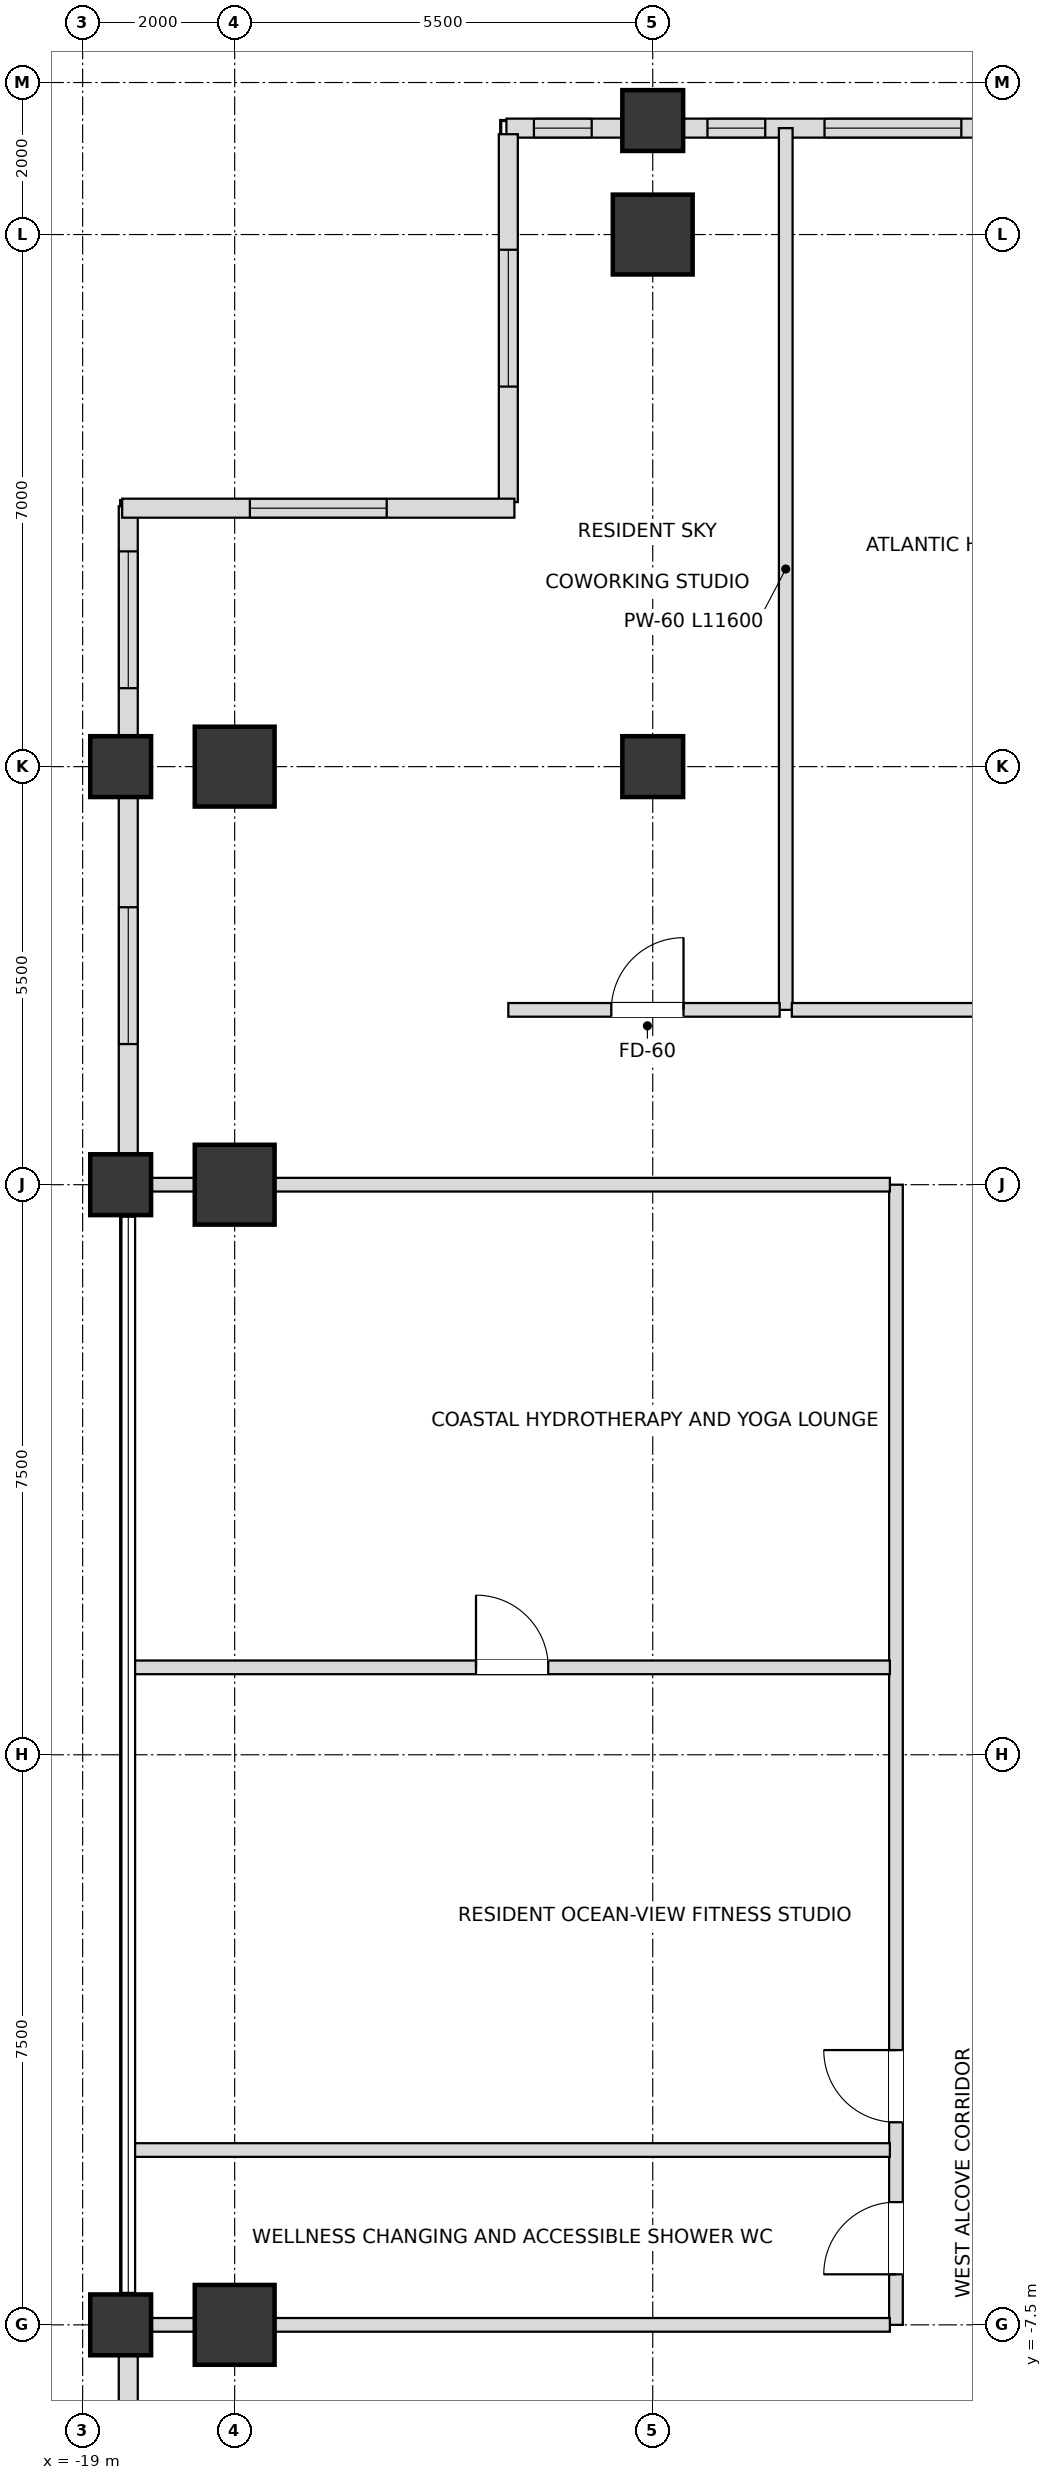
"""IFC4 building model, lengths in metres.
Left out: names, types, materials, properties, quantities, classifications, styles, units other than length and angle.
Written with IfcOpenShell. Run it as: python <this file> out.ifc"""

import sys

from ifc_helpers import new_model, si_unit, direction, frame, frame_2d, origin, origin_2d, place, context, subcontext, project, spatial, rectangle, extrude, element, fill, save


model = new_model("IFC4")
c1 = context("Model", 3, precision=1e-05, world=origin(), true_north=direction((0.0, 1.0)))
c2 = subcontext(c1, "Body", "Model", "MODEL_VIEW")
j1 = project(units=[si_unit("LENGTHUNIT", "METRE"), si_unit("PLANEANGLEUNIT", "RADIAN")], contexts=[c1])
p1 = place(None, origin())
s1 = spatial("IfcSite", under=j1, at=p1, CompositionType="ELEMENT")
p2 = place(p1, origin())
s2 = spatial("IfcBuilding", under=s1, at=p2, CompositionType="ELEMENT")
p3 = place(p2, frame((0.0, 0.0, 205.2)))
s3 = spatial("IfcBuildingStorey", under=s2, at=p3, CompositionType="ELEMENT", Elevation=205.2)
for number, where, z_axis, x_axis in (
    (1, (-11.5, 20.0, 0.0), (0.0, 0.0, 1.0), (1.0, 0.0, 0.0)),
    (2, (-17.0, 13.0, 0.0), (0.0, 0.0, 1.0), (1.0, 0.0, 0.0)),
    (3, (-17.0, 7.5, 0.0), (0.0, 0.0, 1.0), (1.0, 0.0, 0.0)),
    (4, (-17.0, -7.5, 0.0), (0.0, 0.0, 1.0), (1.0, 0.0, 0.0)),
):
    element("IfcColumn", number, at=place(p3, frame(where, z_axis=z_axis, x_axis=x_axis)), inside=s3, PredefinedType="USERDEFINED", context=c2, shape_type="SweptSolid", body=[
        extrude(rectangle(XDim=1.05, YDim=1.05, at=origin_2d()), origin(), (0.0, 0.0, 1.0), 3.6),
    ])
for number, where, z_axis, x_axis in (
    (5, (-11.5, 13.0, 0.0), (0.0, 0.0, 1.0), (1.0, 0.0, 0.0)),
    (6, (-18.5, -7.5, 0.0), (0.0, 0.0, 1.0), (1.0, 0.0, 0.0)),
    (7, (-18.5, 7.5, 0.0), (0.0, 0.0, 1.0), (1.0, 0.0, 0.0)),
    (8, (-18.5, 13.0, 0.0), (0.0, 0.0, 1.0), (1.0, 0.0, 0.0)),
    (9, (-11.5, 21.5, 0.0), (0.0, 0.0, 1.0), (1.0, 0.0, 0.0)),
):
    element("IfcColumn", number, at=place(p3, frame(where, z_axis=z_axis, x_axis=x_axis)), inside=s3, PredefinedType="COLUMN", context=c2, shape_type="SweptSolid", body=[
        extrude(rectangle(XDim=0.8, YDim=0.8, at=origin_2d()), origin(), (0.0, 0.0, 1.0), 3.6),
    ])
p4 = place(p3, frame((-6.895, 21.4, 0.0), z_axis=(0.0, 0.0, 1.0), x_axis=(-1.0, 0.0, 0.0)))
e10 = element("IfcWall", 10, at=p4, inside=s3, PredefinedType="SOLIDWALL", context=c2, shape_type="SweptSolid", body=[
    extrude(rectangle(XDim=4.21, YDim=0.25, at=frame_2d((2.105, 0.0))), origin(), (0.0, 0.0, 1.0), 2.748),
])
p5 = place(p4, frame((0.545, 0.0, 0.72)))
e11 = element("IfcOpeningElement", 11, at=p5, cuts=e10, PredefinedType="OPENING", context=c2, shape_type="SweptSolid", body=[
    extrude(rectangle(XDim=1.8, YDim=1.68, at=frame_2d((0.9, 0.84))), frame((0.0, 0.135, 0.0), z_axis=(0.0, -1.0, 0.0), x_axis=(1.0, 0.0, 0.0)), (0.0, 0.0, 1.0), 0.27),
])
p6 = place(p4, frame((3.125, 0.0, 0.72)))
e12 = element("IfcOpeningElement", 12, at=p6, cuts=e10, PredefinedType="OPENING", context=c2, shape_type="SweptSolid", body=[
    extrude(rectangle(XDim=0.76, YDim=1.68, at=frame_2d((0.38, 0.84))), frame((0.0, 0.135, 0.0), z_axis=(0.0, -1.0, 0.0), x_axis=(1.0, 0.0, 0.0)), (0.0, 0.0, 1.0), 0.27),
])
p7 = place(p3, frame((-11.895, 21.4, 0.0), z_axis=(0.0, 0.0, 1.0), x_axis=(-1.0, 0.0, 0.0)))
e13 = element("IfcWall", 13, at=p7, inside=s3, PredefinedType="SOLIDWALL", context=c2, shape_type="SweptSolid", body=[
    extrude(rectangle(XDim=1.53, YDim=0.25, at=frame_2d((0.765, 0.0))), origin(), (0.0, 0.0, 1.0), 2.748),
])
p8 = place(p7, frame((0.408, 0.0, 0.72)))
e14 = element("IfcOpeningElement", 14, at=p8, cuts=e13, PredefinedType="OPENING", context=c2, shape_type="SweptSolid", body=[
    extrude(rectangle(XDim=0.76, YDim=1.68, at=frame_2d((0.38, 0.84))), frame((0.0, 0.135, 0.0), z_axis=(0.0, -1.0, 0.0), x_axis=(1.0, 0.0, 0.0)), (0.0, 0.0, 1.0), 0.27),
])
p9 = place(p3, frame((-18.4, 16.425, 0.0), z_axis=(0.0, 0.0, 1.0), x_axis=(0.0, -1.0, 0.0)))
e15 = element("IfcWall", 15, at=p9, inside=s3, PredefinedType="SOLIDWALL", context=c2, shape_type="SweptSolid", body=[
    extrude(rectangle(XDim=3.03, YDim=0.25, at=frame_2d((1.515, 0.0))), origin(), (0.0, 0.0, 1.0), 2.748),
])
p10 = place(p9, frame((0.593, 0.0, 0.72)))
e16 = element("IfcOpeningElement", 16, at=p10, cuts=e15, PredefinedType="OPENING", context=c2, shape_type="SweptSolid", body=[
    extrude(rectangle(XDim=1.8, YDim=1.68, at=frame_2d((0.9, 0.84))), frame((0.0, 0.135, 0.0), z_axis=(0.0, -1.0, 0.0), x_axis=(1.0, 0.0, 0.0)), (0.0, 0.0, 1.0), 0.27),
])
p11 = place(p3, frame((-18.4, 12.605, 0.0), z_axis=(0.0, 0.0, 1.0), x_axis=(0.0, -1.0, 0.0)))
e17 = element("IfcWall", 17, at=p11, inside=s3, PredefinedType="SOLIDWALL", context=c2, shape_type="SweptSolid", body=[
    extrude(rectangle(XDim=4.71, YDim=0.25, at=frame_2d((2.355, 0.0))), origin(), (0.0, 0.0, 1.0), 2.748),
])
p12 = place(p11, frame((1.455, 0.0, 0.72)))
e18 = element("IfcOpeningElement", 18, at=p12, cuts=e17, PredefinedType="OPENING", context=c2, shape_type="SweptSolid", body=[
    extrude(rectangle(XDim=1.8, YDim=1.68, at=frame_2d((0.9, 0.84))), frame((0.0, 0.135, 0.0), z_axis=(0.0, -1.0, 0.0), x_axis=(1.0, 0.0, 0.0)), (0.0, 0.0, 1.0), 0.27),
])
p13 = place(p3, frame((-18.4, -7.895, 0.0), z_axis=(0.0, 0.0, 1.0), x_axis=(0.0, -1.0, 0.0)))
e19 = element("IfcWall", 19, at=p13, inside=s3, PredefinedType="SOLIDWALL", context=c2, shape_type="SweptSolid", body=[
    extrude(rectangle(XDim=4.71, YDim=0.25, at=frame_2d((2.355, 0.0))), origin(), (0.0, 0.0, 1.0), 2.748),
])
p14 = place(p13, frame((1.455, 0.0, 0.72)))
e20 = element("IfcOpeningElement", 20, at=p14, cuts=e19, PredefinedType="OPENING", context=c2, shape_type="SweptSolid", body=[
    extrude(rectangle(XDim=1.8, YDim=1.68, at=frame_2d((0.9, 0.84))), frame((0.0, 0.135, 0.0), z_axis=(0.0, -1.0, 0.0), x_axis=(1.0, 0.0, 0.0)), (0.0, 0.0, 1.0), 0.27),
])
p15 = place(p3, frame((-13.4, 21.32, 0.0), z_axis=(0.0, 0.0, 1.0), x_axis=(0.0, -1.0, 0.0)))
e21 = element("IfcWall", 21, at=p15, inside=s3, PredefinedType="SOLIDWALL", context=c2, shape_type="SweptSolid", body=[
    extrude(rectangle(XDim=4.84, YDim=0.25, at=frame_2d((2.42, 0.0))), origin(), (0.0, 0.0, 1.0), 2.748),
])
p16 = place(p15, frame((1.52, 0.0, 0.72)))
e22 = element("IfcOpeningElement", 22, at=p16, cuts=e21, PredefinedType="OPENING", context=c2, shape_type="SweptSolid", body=[
    extrude(rectangle(XDim=1.8, YDim=1.68, at=frame_2d((0.9, 0.84))), frame((0.0, 0.135, 0.0), z_axis=(0.0, -1.0, 0.0), x_axis=(1.0, 0.0, 0.0)), (0.0, 0.0, 1.0), 0.27),
])
p17 = place(p3, frame((-13.32, 16.4, 0.0), z_axis=(0.0, 0.0, 1.0), x_axis=(-1.0, 0.0, 0.0)))
e23 = element("IfcWall", 23, at=p17, inside=s3, PredefinedType="SOLIDWALL", context=c2, shape_type="SweptSolid", body=[
    extrude(rectangle(XDim=5.16, YDim=0.25, at=frame_2d((2.58, 0.0))), origin(), (0.0, 0.0, 1.0), 2.748),
])
p18 = place(p17, frame((1.68, 0.0, 0.72)))
e24 = element("IfcOpeningElement", 24, at=p18, cuts=e23, PredefinedType="OPENING", context=c2, shape_type="SweptSolid", body=[
    extrude(rectangle(XDim=1.8, YDim=1.68, at=frame_2d((0.9, 0.84))), frame((0.0, 0.135, 0.0), z_axis=(0.0, -1.0, 0.0), x_axis=(1.0, 0.0, 0.0)), (0.0, 0.0, 1.0), 0.27),
])
p19 = place(p3, frame((-9.75, 9.8, 0.0), z_axis=(0.0, 0.0, 1.0), x_axis=(0.0, 1.0, 0.0)))
e25 = element("IfcWall", 25, at=p19, inside=s3, PredefinedType="PARTITIONING", context=c2, shape_type="SweptSolid", body=[
    extrude(rectangle(XDim=11.6, YDim=0.18, at=frame_2d((5.8, 0.0))), origin(), (0.0, 0.0, 1.0), 2.826),
])
p20 = place(p3, frame((-8.3, -7.5, 0.0), z_axis=(0.0, 0.0, 1.0), x_axis=(0.0, 1.0, 0.0)))
e26 = element("IfcWall", 26, at=p20, inside=s3, PredefinedType="PARTITIONING", context=c2, shape_type="SweptSolid", body=[
    extrude(rectangle(XDim=15.0, YDim=0.18, at=frame_2d((7.5, 0.0))), origin(), (0.0, 0.0, 1.0), 3.38),
])
p21 = place(p20, frame((0.665, 0.0, 0.0)))
e27 = element("IfcOpeningElement", 27, at=p21, cuts=e26, PredefinedType="OPENING", context=c2, shape_type="SweptSolid", body=[
    extrude(rectangle(XDim=0.95, YDim=2.15, at=frame_2d((0.475, 1.075))), frame((0.0, 0.1, 0.0), z_axis=(0.0, -1.0, 0.0), x_axis=(1.0, 0.0, 0.0)), (0.0, 0.0, 1.0), 0.2),
])
p22 = place(p20, frame((2.665, 0.0, 0.0)))
e28 = element("IfcOpeningElement", 28, at=p22, cuts=e26, PredefinedType="OPENING", context=c2, shape_type="SweptSolid", body=[
    extrude(rectangle(XDim=0.95, YDim=2.15, at=frame_2d((0.475, 1.075))), frame((0.0, 0.1, 0.0), z_axis=(0.0, -1.0, 0.0), x_axis=(1.0, 0.0, 0.0)), (0.0, 0.0, 1.0), 0.2),
])
p23 = place(p3, frame((-18.4, -7.5, 0.0), z_axis=(0.0, 0.0, 1.0), x_axis=(1.0, 0.0, 0.0)))
e29 = element("IfcWall", 29, at=p23, inside=s3, PredefinedType="PARTITIONING", context=c2, shape_type="SweptSolid", body=[
    extrude(rectangle(XDim=10.02, YDim=0.18, at=frame_2d((5.01, 0.0))), origin(), (0.0, 0.0, 1.0), 2.826),
])
p24 = place(p3, frame((-18.32, -5.2, 0.0), z_axis=(0.0, 0.0, 1.0), x_axis=(1.0, 0.0, 0.0)))
e30 = element("IfcWall", 30, at=p24, inside=s3, PredefinedType="PARTITIONING", context=c2, shape_type="SweptSolid", body=[
    extrude(rectangle(XDim=9.94, YDim=0.18, at=frame_2d((4.97, 0.0))), origin(), (0.0, 0.0, 1.0), 2.826),
])
p25 = place(p3, frame((-18.32, 1.15, 0.0), z_axis=(0.0, 0.0, 1.0), x_axis=(1.0, 0.0, 0.0)))
e31 = element("IfcWall", 31, at=p25, inside=s3, PredefinedType="PARTITIONING", context=c2, shape_type="SweptSolid", body=[
    extrude(rectangle(XDim=9.94, YDim=0.18, at=frame_2d((4.97, 0.0))), origin(), (0.0, 0.0, 1.0), 2.826),
])
p26 = place(p25, frame((4.495, 0.0, 0.0)))
e32 = element("IfcOpeningElement", 32, at=p26, cuts=e31, PredefinedType="OPENING", context=c2, shape_type="SweptSolid", body=[
    extrude(rectangle(XDim=0.95, YDim=2.15, at=frame_2d((0.475, 1.075))), frame((0.0, 0.1, 0.0), z_axis=(0.0, -1.0, 0.0), x_axis=(1.0, 0.0, 0.0)), (0.0, 0.0, 1.0), 0.2),
])
p27 = place(p3, frame((-18.4, 7.5, 0.0), z_axis=(0.0, 0.0, 1.0), x_axis=(1.0, 0.0, 0.0)))
e33 = element("IfcWall", 33, at=p27, inside=s3, PredefinedType="PARTITIONING", context=c2, shape_type="SweptSolid", body=[
    extrude(rectangle(XDim=10.02, YDim=0.18, at=frame_2d((5.01, 0.0))), origin(), (0.0, 0.0, 1.0), 2.826),
])
p28 = place(p3, frame((-13.4, 9.8, 0.0), z_axis=(0.0, 0.0, 1.0), x_axis=(1.0, 0.0, 0.0)))
e34 = element("IfcWall", 34, at=p28, inside=s3, PredefinedType="PARTITIONING", context=c2, shape_type="SweptSolid", body=[
    extrude(rectangle(XDim=3.57, YDim=0.18, at=frame_2d((1.785, 0.0))), origin(), (0.0, 0.0, 1.0), 3.38),
])
p29 = place(p28, frame((1.355, 0.0, 0.0)))
e35 = element("IfcOpeningElement", 35, at=p29, cuts=e34, PredefinedType="OPENING", context=c2, shape_type="SweptSolid", body=[
    extrude(rectangle(XDim=0.95, YDim=2.15, at=frame_2d((0.475, 1.075))), frame((0.0, 0.1, 0.0), z_axis=(0.0, -1.0, 0.0), x_axis=(1.0, 0.0, 0.0)), (0.0, 0.0, 1.0), 0.2),
])
p30 = place(p3, frame((-9.67, 9.8, 0.0), z_axis=(0.0, 0.0, 1.0), x_axis=(1.0, 0.0, 0.0)))
e36 = element("IfcWall", 36, at=p30, inside=s3, PredefinedType="PARTITIONING", context=c2, shape_type="SweptSolid", body=[
    extrude(rectangle(XDim=6.24, YDim=0.18, at=frame_2d((3.12, 0.0))), origin(), (0.0, 0.0, 1.0), 2.826),
])
p31 = place(p30, frame((2.655, 0.0, 0.0)))
e37 = element("IfcOpeningElement", 37, at=p31, cuts=e36, PredefinedType="OPENING", context=c2, shape_type="SweptSolid", body=[
    extrude(rectangle(XDim=0.95, YDim=2.15, at=frame_2d((0.475, 1.075))), frame((0.0, 0.1, 0.0), z_axis=(0.0, -1.0, 0.0), x_axis=(1.0, 0.0, 0.0)), (0.0, 0.0, 1.0), 0.2),
])
p32 = place(p5, origin())
e38 = element("IfcWindow", 38, at=p32, inside=s3, PartitioningType="SINGLE_PANEL", PredefinedType="WINDOW", context=c2, shape_type="SweptSolid", body=[
    extrude(rectangle(XDim=1.8, YDim=1.68, at=frame_2d((0.9, 0.84))), frame((0.0, 0.03, 0.0), z_axis=(0.0, -1.0, 0.0), x_axis=(1.0, 0.0, 0.0)), (0.0, 0.0, 1.0), 0.06),
])
fill(e11, e38)
p33 = place(p6, origin())
e39 = element("IfcWindow", 39, at=p33, inside=s3, PartitioningType="SINGLE_PANEL", PredefinedType="WINDOW", context=c2, shape_type="SweptSolid", body=[
    extrude(rectangle(XDim=0.76, YDim=1.68, at=frame_2d((0.38, 0.84))), frame((0.0, 0.03, 0.0), z_axis=(0.0, -1.0, 0.0), x_axis=(1.0, 0.0, 0.0)), (0.0, 0.0, 1.0), 0.06),
])
fill(e12, e39)
p34 = place(p8, origin())
e40 = element("IfcWindow", 40, at=p34, inside=s3, PartitioningType="SINGLE_PANEL", PredefinedType="WINDOW", context=c2, shape_type="SweptSolid", body=[
    extrude(rectangle(XDim=0.76, YDim=1.68, at=frame_2d((0.38, 0.84))), frame((0.0, 0.03, 0.0), z_axis=(0.0, -1.0, 0.0), x_axis=(1.0, 0.0, 0.0)), (0.0, 0.0, 1.0), 0.06),
])
fill(e14, e40)
p35 = place(p10, origin())
e41 = element("IfcWindow", 41, at=p35, inside=s3, PartitioningType="SINGLE_PANEL", PredefinedType="WINDOW", context=c2, shape_type="SweptSolid", body=[
    extrude(rectangle(XDim=1.8, YDim=1.68, at=frame_2d((0.9, 0.84))), frame((0.0, 0.03, 0.0), z_axis=(0.0, -1.0, 0.0), x_axis=(1.0, 0.0, 0.0)), (0.0, 0.0, 1.0), 0.06),
])
fill(e16, e41)
p36 = place(p12, origin())
e42 = element("IfcWindow", 42, at=p36, inside=s3, PartitioningType="SINGLE_PANEL", PredefinedType="WINDOW", context=c2, shape_type="SweptSolid", body=[
    extrude(rectangle(XDim=1.8, YDim=1.68, at=frame_2d((0.9, 0.84))), frame((0.0, 0.03, 0.0), z_axis=(0.0, -1.0, 0.0), x_axis=(1.0, 0.0, 0.0)), (0.0, 0.0, 1.0), 0.06),
])
fill(e18, e42)
p37 = place(p16, origin())
e43 = element("IfcWindow", 43, at=p37, inside=s3, PartitioningType="SINGLE_PANEL", PredefinedType="WINDOW", context=c2, shape_type="SweptSolid", body=[
    extrude(rectangle(XDim=1.8, YDim=1.68, at=frame_2d((0.9, 0.84))), frame((0.0, 0.03, 0.0), z_axis=(0.0, -1.0, 0.0), x_axis=(1.0, 0.0, 0.0)), (0.0, 0.0, 1.0), 0.06),
])
fill(e22, e43)
p38 = place(p18, origin())
e44 = element("IfcWindow", 44, at=p38, inside=s3, PartitioningType="SINGLE_PANEL", PredefinedType="WINDOW", context=c2, shape_type="SweptSolid", body=[
    extrude(rectangle(XDim=1.8, YDim=1.68, at=frame_2d((0.9, 0.84))), frame((0.0, 0.03, 0.0), z_axis=(0.0, -1.0, 0.0), x_axis=(1.0, 0.0, 0.0)), (0.0, 0.0, 1.0), 0.06),
])
fill(e24, e44)
p39 = place(p29, origin())
e45 = element("IfcDoor", 45, at=p39, inside=s3, OperationType="SINGLE_SWING_RIGHT", PredefinedType="DOOR", context=c2, shape_type="SweptSolid", body=[
    extrude(rectangle(XDim=0.95, YDim=2.15, at=frame_2d((0.475, 1.075))), frame((0.0, 0.025, 0.0), z_axis=(0.0, -1.0, 0.0), x_axis=(1.0, 0.0, 0.0)), (0.0, 0.0, 1.0), 0.05),
])
fill(e35, e45)
p40 = place(p21, origin())
e46 = element("IfcDoor", 46, at=p40, inside=s3, OperationType="SINGLE_SWING_LEFT", PredefinedType="DOOR", context=c2, shape_type="SweptSolid", body=[
    extrude(rectangle(XDim=0.95, YDim=2.15, at=frame_2d((0.475, 1.075))), frame((0.0, 0.025, 0.0), z_axis=(0.0, -1.0, 0.0), x_axis=(1.0, 0.0, 0.0)), (0.0, 0.0, 1.0), 0.05),
])
fill(e27, e46)
p41 = place(p22, origin())
e47 = element("IfcDoor", 47, at=p41, inside=s3, OperationType="SINGLE_SWING_RIGHT", PredefinedType="DOOR", context=c2, shape_type="SweptSolid", body=[
    extrude(rectangle(XDim=0.95, YDim=2.15, at=frame_2d((0.475, 1.075))), frame((0.0, 0.025, 0.0), z_axis=(0.0, -1.0, 0.0), x_axis=(1.0, 0.0, 0.0)), (0.0, 0.0, 1.0), 0.05),
])
fill(e28, e47)
p42 = place(p26, origin())
e48 = element("IfcDoor", 48, at=p42, inside=s3, OperationType="SINGLE_SWING_LEFT", PredefinedType="DOOR", context=c2, shape_type="SweptSolid", body=[
    extrude(rectangle(XDim=0.95, YDim=2.15, at=frame_2d((0.475, 1.075))), frame((0.0, 0.025, 0.0), z_axis=(0.0, -1.0, 0.0), x_axis=(1.0, 0.0, 0.0)), (0.0, 0.0, 1.0), 0.05),
])
fill(e32, e48)
save(model, sys.argv[1])
